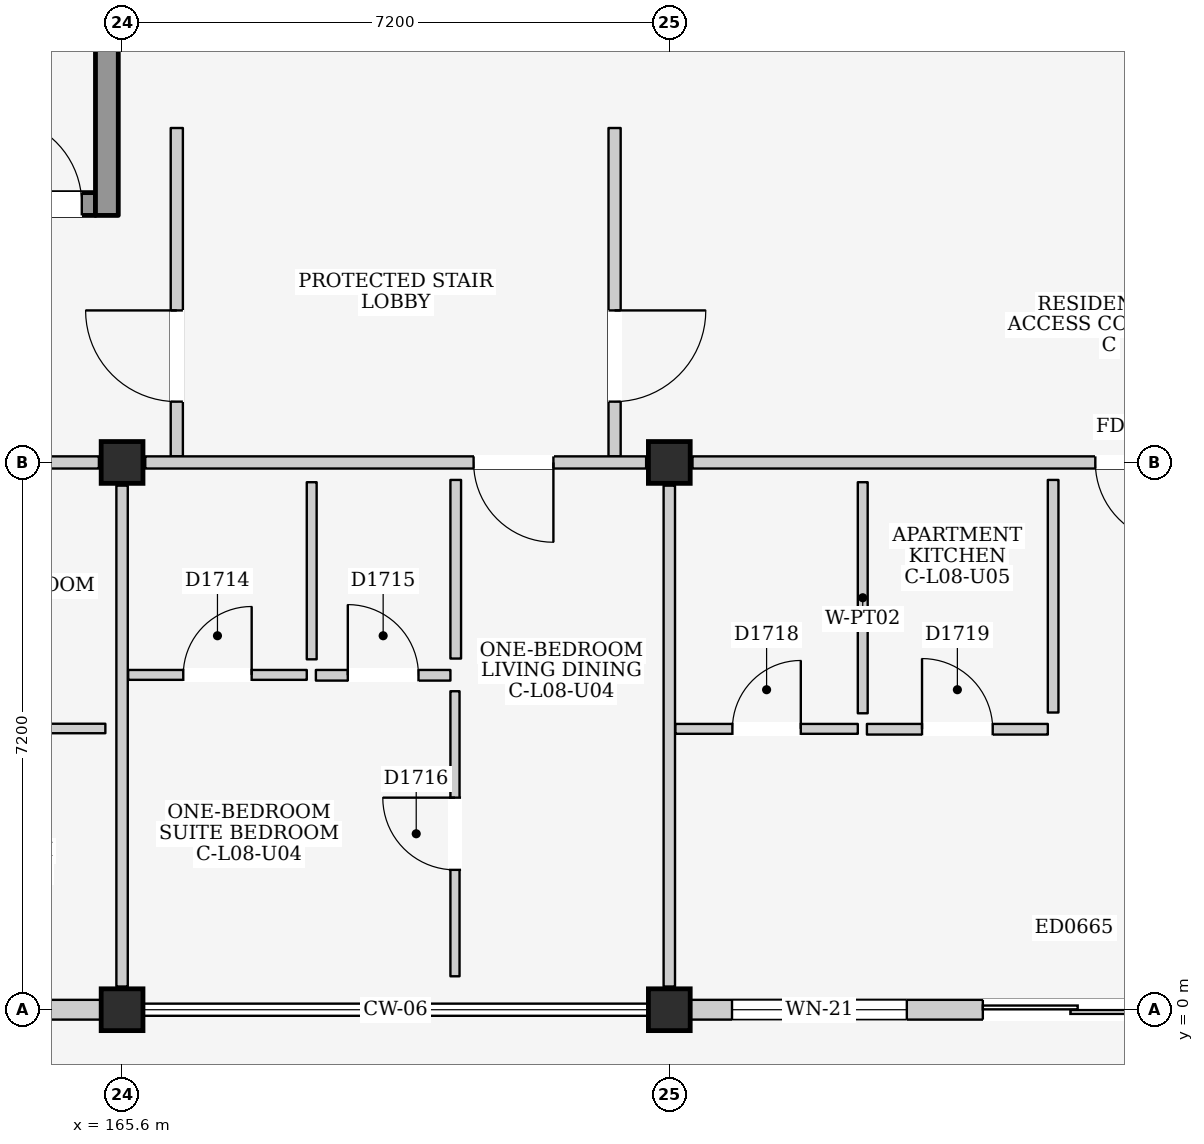
"""IFC4 building model, lengths in metres.
Left out: names, types, materials, properties, quantities, classifications, styles, units other than length and angle.
Written with IfcOpenShell. Run it as: python <this file> out.ifc"""

import sys

from ifc_helpers import new_model, si_unit, direction, frame, frame_2d, origin, origin_2d, place, context, subcontext, project, spatial, rectangle, extrude, element, fill, save


model = new_model("IFC4")
c1 = context("Model", 3, precision=1e-05, world=origin(), true_north=direction((0.0, 1.0)))
c2 = subcontext(c1, "Body", "Model", "MODEL_VIEW")
j1 = project(units=[si_unit("LENGTHUNIT", "METRE"), si_unit("PLANEANGLEUNIT", "RADIAN")], contexts=[c1])
p1 = place(None, origin())
s1 = spatial("IfcSite", under=j1, at=p1, CompositionType="ELEMENT")
p2 = place(p1, origin())
s2 = spatial("IfcBuilding", under=s1, at=p2, CompositionType="ELEMENT")
p3 = place(p2, frame((0.0, 0.0, 28.3)))
s3 = spatial("IfcBuildingStorey", under=s2, at=p3, CompositionType="ELEMENT", Elevation=28.3)
for number, where, z_axis, x_axis in (
    (1, (165.6, 0.0, 0.0), (0.0, 0.0, 1.0), (1.0, 0.0, 0.0)),
    (2, (165.6, 7.2, 0.0), (0.0, 0.0, 1.0), (1.0, 0.0, 0.0)),
    (3, (172.8, 0.0, 0.0), (0.0, 0.0, 1.0), (1.0, 0.0, 0.0)),
    (4, (172.8, 7.2, 0.0), (0.0, 0.0, 1.0), (1.0, 0.0, 0.0)),
):
    element("IfcColumn", number, at=place(p3, frame(where, z_axis=z_axis, x_axis=x_axis)), inside=s3, PredefinedType="COLUMN", context=c2, shape_type="SweptSolid", body=[
        extrude(rectangle(XDim=0.55, YDim=0.55, at=origin_2d()), origin(), (0.0, 0.0, 1.0), 3.2),
    ])
p4 = place(p3, frame((158.675, 0.0, 0.0), z_axis=(0.0, 0.0, 1.0), x_axis=(1.0, 0.0, 0.0)))
e5 = element("IfcWall", 5, at=p4, inside=s3, PredefinedType="ELEMENTEDWALL", context=c2, shape_type="SweptSolid", body=[
    extrude(rectangle(XDim=6.65, YDim=0.26, at=frame_2d((3.325, 0.0))), origin(), (0.0, 0.0, 1.0), 2.485),
])
p5 = place(p4, frame((3.85, 0.0, 0.0)))
e6 = element("IfcOpeningElement", 6, at=p5, cuts=e5, PredefinedType="OPENING", context=c2, shape_type="SweptSolid", body=[
    extrude(rectangle(XDim=1.6, YDim=2.12, at=frame_2d((0.8, 1.06))), frame((0.0, 0.145, 0.0), z_axis=(0.0, -1.0, 0.0), x_axis=(1.0, 0.0, 0.0)), (0.0, 0.0, 1.0), 0.29),
])
p6 = place(p4, frame((0.55, 0.0, 0.9)))
e7 = element("IfcOpeningElement", 7, at=p6, cuts=e5, PredefinedType="OPENING", context=c2, shape_type="SweptSolid", body=[
    extrude(rectangle(XDim=1.65, YDim=1.35, at=frame_2d((0.825, 0.675))), frame((0.0, 0.145, 0.0), z_axis=(0.0, -1.0, 0.0), x_axis=(1.0, 0.0, 0.0)), (0.0, 0.0, 1.0), 0.29),
])
p7 = place(p3, frame((173.075, 0.0, 0.0), z_axis=(0.0, 0.0, 1.0), x_axis=(1.0, 0.0, 0.0)))
e8 = element("IfcWall", 8, at=p7, inside=s3, PredefinedType="ELEMENTEDWALL", context=c2, shape_type="SweptSolid", body=[
    extrude(rectangle(XDim=6.65, YDim=0.26, at=frame_2d((3.325, 0.0))), origin(), (0.0, 0.0, 1.0), 2.485),
])
p8 = place(p7, frame((3.85, 0.0, 0.0)))
e9 = element("IfcOpeningElement", 9, at=p8, cuts=e8, PredefinedType="OPENING", context=c2, shape_type="SweptSolid", body=[
    extrude(rectangle(XDim=2.4, YDim=2.12, at=frame_2d((1.2, 1.06))), frame((0.0, 0.145, 0.0), z_axis=(0.0, -1.0, 0.0), x_axis=(1.0, 0.0, 0.0)), (0.0, 0.0, 1.0), 0.29),
])
p9 = place(p7, frame((0.55, 0.0, 0.775)))
e10 = element("IfcOpeningElement", 10, at=p9, cuts=e8, PredefinedType="OPENING", context=c2, shape_type="SweptSolid", body=[
    extrude(rectangle(XDim=2.3, YDim=1.6, at=frame_2d((1.15, 0.8))), frame((0.0, 0.145, 0.0), z_axis=(0.0, -1.0, 0.0), x_axis=(1.0, 0.0, 0.0)), (0.0, 0.0, 1.0), 0.29),
])
p10 = place(p3, frame((158.75, 10.6, 0.0), z_axis=(0.0, 0.0, 1.0), x_axis=(1.0, 0.0, 0.0)))
e11 = element("IfcWall", 11, at=p10, inside=s3, PredefinedType="SHEAR", context=c2, shape_type="SweptSolid", body=[
    extrude(rectangle(XDim=6.5, YDim=0.3, at=frame_2d((3.25, 0.0))), origin(), (0.0, 0.0, 1.0), 2.95),
])
p11 = place(p10, frame((5.17, 0.0, 0.0)))
e12 = element("IfcOpeningElement", 12, at=p11, cuts=e11, PredefinedType="OPENING", context=c2, shape_type="SweptSolid", body=[
    extrude(rectangle(XDim=1.15, YDim=2.2, at=frame_2d((0.575, 1.1))), frame((0.0, 0.165, 0.0), z_axis=(0.0, -1.0, 0.0), x_axis=(1.0, 0.0, 0.0)), (0.0, 0.0, 1.0), 0.33),
])
p12 = place(p3, frame((165.4, 10.45, 0.0), z_axis=(0.0, 0.0, 1.0), x_axis=(0.0, 1.0, 0.0)))
e13 = element("IfcWall", 13, at=p12, inside=s3, PredefinedType="SHEAR", context=c2, shape_type="SweptSolid", body=[
    extrude(rectangle(XDim=3.6, YDim=0.3, at=frame_2d((1.8, 0.0))), origin(), (0.0, 0.0, 1.0), 2.95),
])
p13 = place(p3, frame((166.32, 7.28, 0.0), z_axis=(0.0, 0.0, 1.0), x_axis=(0.0, 1.0, 0.0)))
e14 = element("IfcWall", 14, at=p13, inside=s3, PredefinedType="PARTITIONING", context=c2, shape_type="SweptSolid", body=[
    extrude(rectangle(XDim=4.32, YDim=0.16, at=frame_2d((2.16, 0.0))), origin(), (0.0, 0.0, 1.0), 2.95),
])
p14 = place(p13, frame((0.72, 0.0, 0.0)))
e15 = element("IfcOpeningElement", 15, at=p14, cuts=e14, PredefinedType="OPENING", context=c2, shape_type="SweptSolid", body=[
    extrude(rectangle(XDim=1.2, YDim=2.2, at=frame_2d((0.6, 1.1))), frame((0.0, 0.095, 0.0), z_axis=(0.0, -1.0, 0.0), x_axis=(1.0, 0.0, 0.0)), (0.0, 0.0, 1.0), 0.19),
])
p15 = place(p3, frame((172.08, 7.28, 0.0), z_axis=(0.0, 0.0, 1.0), x_axis=(0.0, 1.0, 0.0)))
e16 = element("IfcWall", 16, at=p15, inside=s3, PredefinedType="PARTITIONING", context=c2, shape_type="SweptSolid", body=[
    extrude(rectangle(XDim=4.32, YDim=0.16, at=frame_2d((2.16, 0.0))), origin(), (0.0, 0.0, 1.0), 2.95),
])
p16 = place(p15, frame((0.72, 0.0, 0.0)))
e17 = element("IfcOpeningElement", 17, at=p16, cuts=e16, PredefinedType="OPENING", context=c2, shape_type="SweptSolid", body=[
    extrude(rectangle(XDim=1.2, YDim=2.2, at=frame_2d((0.6, 1.1))), frame((0.0, 0.095, 0.0), z_axis=(0.0, -1.0, 0.0), x_axis=(1.0, 0.0, 0.0)), (0.0, 0.0, 1.0), 0.19),
])
p17 = place(p3, frame((158.705, 7.2, 0.0), z_axis=(0.0, 0.0, 1.0), x_axis=(1.0, 0.0, 0.0)))
e18 = element("IfcWall", 18, at=p17, inside=s3, PredefinedType="PARTITIONING", context=c2, shape_type="SweptSolid", body=[
    extrude(rectangle(XDim=6.59, YDim=0.16, at=frame_2d((3.295, 0.0))), origin(), (0.0, 0.0, 1.0), 2.335),
])
p18 = place(p3, frame((165.6, 0.305, 0.0), z_axis=(0.0, 0.0, 1.0), x_axis=(0.0, 1.0, 0.0)))
e19 = element("IfcWall", 19, at=p18, inside=s3, PredefinedType="PARTITIONING", context=c2, shape_type="SweptSolid", body=[
    extrude(rectangle(XDim=6.59, YDim=0.15, at=frame_2d((3.295, 0.0))), origin(), (0.0, 0.0, 1.0), 2.435),
])
p19 = place(p3, frame((161.32, 3.7, 0.0), z_axis=(0.0, 0.0, 1.0), x_axis=(1.0, 0.0, 0.0)))
e20 = element("IfcWall", 20, at=p19, inside=s3, PredefinedType="PARTITIONING", context=c2, shape_type="SweptSolid", body=[
    extrude(rectangle(XDim=4.06, YDim=0.125, at=frame_2d((2.03, 0.0))), origin(), (0.0, 0.0, 1.0), 2.95),
])
p20 = place(p3, frame((165.905, 7.2, 0.0), z_axis=(0.0, 0.0, 1.0), x_axis=(1.0, 0.0, 0.0)))
e21 = element("IfcWall", 21, at=p20, inside=s3, PredefinedType="PARTITIONING", context=c2, shape_type="SweptSolid", body=[
    extrude(rectangle(XDim=6.59, YDim=0.16, at=frame_2d((3.295, 0.0))), origin(), (0.0, 0.0, 1.0), 2.335),
])
p21 = place(p20, frame((4.32, 0.0, 0.0)))
e22 = element("IfcOpeningElement", 22, at=p21, cuts=e21, PredefinedType="OPENING", context=c2, shape_type="SweptSolid", body=[
    extrude(rectangle(XDim=1.05, YDim=2.15, at=frame_2d((0.525, 1.075))), frame((0.0, 0.095, 0.0), z_axis=(0.0, -1.0, 0.0), x_axis=(1.0, 0.0, 0.0)), (0.0, 0.0, 1.0), 0.19),
])
p22 = place(p3, frame((172.8, 0.305, 0.0), z_axis=(0.0, 0.0, 1.0), x_axis=(0.0, 1.0, 0.0)))
e23 = element("IfcWall", 23, at=p22, inside=s3, PredefinedType="PARTITIONING", context=c2, shape_type="SweptSolid", body=[
    extrude(rectangle(XDim=6.59, YDim=0.15, at=frame_2d((3.295, 0.0))), origin(), (0.0, 0.0, 1.0), 2.435),
])
p23 = place(p3, frame((165.68, 4.405, 0.0), z_axis=(0.0, 0.0, 1.0), x_axis=(1.0, 0.0, 0.0)))
e24 = element("IfcWall", 24, at=p23, inside=s3, PredefinedType="PARTITIONING", context=c2, shape_type="SweptSolid", body=[
    extrude(rectangle(XDim=2.35, YDim=0.13, at=frame_2d((1.175, 0.0))), origin(), (0.0, 0.0, 1.0), 2.95),
])
p24 = place(p23, frame((0.725, 0.0, 0.0)))
e25 = element("IfcOpeningElement", 25, at=p24, cuts=e24, PredefinedType="OPENING", context=c2, shape_type="SweptSolid", body=[
    extrude(rectangle(XDim=0.9, YDim=2.1, at=frame_2d((0.45, 1.05))), frame((0.0, 0.08, 0.0), z_axis=(0.0, -1.0, 0.0), x_axis=(1.0, 0.0, 0.0)), (0.0, 0.0, 1.0), 0.16),
])
p25 = place(p3, frame((168.095, 4.61, 0.0), z_axis=(0.0, 0.0, 1.0), x_axis=(0.0, 1.0, 0.0)))
e26 = element("IfcWall", 26, at=p25, inside=s3, PredefinedType="PARTITIONING", context=c2, shape_type="SweptSolid", body=[
    extrude(rectangle(XDim=2.33, YDim=0.13, at=frame_2d((1.165, 0.0))), origin(), (0.0, 0.0, 1.0), 2.95),
])
p26 = place(p3, frame((168.15, 4.4, 0.0), z_axis=(0.0, 0.0, 1.0), x_axis=(1.0, 0.0, 0.0)))
e27 = element("IfcWall", 27, at=p26, inside=s3, PredefinedType="PARTITIONING", context=c2, shape_type="SweptSolid", body=[
    extrude(rectangle(XDim=1.77, YDim=0.14, at=frame_2d((0.885, 0.0))), origin(), (0.0, 0.0, 1.0), 2.95),
])
p27 = place(p26, frame((0.42, 0.0, 0.0)))
e28 = element("IfcOpeningElement", 28, at=p27, cuts=e27, PredefinedType="OPENING", context=c2, shape_type="SweptSolid", body=[
    extrude(rectangle(XDim=0.93, YDim=2.14, at=frame_2d((0.465, 1.07))), frame((0.0, 0.085, 0.0), z_axis=(0.0, -1.0, 0.0), x_axis=(1.0, 0.0, 0.0)), (0.0, 0.0, 1.0), 0.17),
])
p28 = place(p3, frame((169.99, 4.62, 0.0), z_axis=(0.0, 0.0, 1.0), x_axis=(0.0, 1.0, 0.0)))
e29 = element("IfcWall", 29, at=p28, inside=s3, PredefinedType="PARTITIONING", context=c2, shape_type="SweptSolid", body=[
    extrude(rectangle(XDim=2.35, YDim=0.14, at=frame_2d((1.175, 0.0))), origin(), (0.0, 0.0, 1.0), 2.95),
])
p29 = place(p3, frame((169.98, 0.44, 0.0), z_axis=(0.0, 0.0, 1.0), x_axis=(0.0, 1.0, 0.0)))
e30 = element("IfcWall", 30, at=p29, inside=s3, PredefinedType="PARTITIONING", context=c2, shape_type="SweptSolid", body=[
    extrude(rectangle(XDim=3.75, YDim=0.12, at=frame_2d((1.875, 0.0))), origin(), (0.0, 0.0, 1.0), 2.95),
])
p30 = place(p29, frame((1.4, 0.0, 0.0)))
e31 = element("IfcOpeningElement", 31, at=p30, cuts=e30, PredefinedType="OPENING", context=c2, shape_type="SweptSolid", body=[
    extrude(rectangle(XDim=0.95, YDim=2.15, at=frame_2d((0.475, 1.075))), frame((0.0, 0.075, 0.0), z_axis=(0.0, -1.0, 0.0), x_axis=(1.0, 0.0, 0.0)), (0.0, 0.0, 1.0), 0.15),
])
p31 = place(p3, frame((173.105, 7.2, 0.0), z_axis=(0.0, 0.0, 1.0), x_axis=(1.0, 0.0, 0.0)))
e32 = element("IfcWall", 32, at=p31, inside=s3, PredefinedType="PARTITIONING", context=c2, shape_type="SweptSolid", body=[
    extrude(rectangle(XDim=6.59, YDim=0.16, at=frame_2d((3.295, 0.0))), origin(), (0.0, 0.0, 1.0), 2.335),
])
p32 = place(p31, frame((5.3, 0.0, 0.0)))
e33 = element("IfcOpeningElement", 33, at=p32, cuts=e32, PredefinedType="OPENING", context=c2, shape_type="SweptSolid", body=[
    extrude(rectangle(XDim=1.05, YDim=2.15, at=frame_2d((0.525, 1.075))), frame((0.0, 0.095, 0.0), z_axis=(0.0, -1.0, 0.0), x_axis=(1.0, 0.0, 0.0)), (0.0, 0.0, 1.0), 0.19),
])
p33 = place(p3, frame((172.88, 3.695, 0.0), z_axis=(0.0, 0.0, 1.0), x_axis=(1.0, 0.0, 0.0)))
e34 = element("IfcWall", 34, at=p33, inside=s3, PredefinedType="PARTITIONING", context=c2, shape_type="SweptSolid", body=[
    extrude(rectangle(XDim=2.4, YDim=0.13, at=frame_2d((1.2, 0.0))), origin(), (0.0, 0.0, 1.0), 2.95),
])
p34 = place(p33, frame((0.75, 0.0, 0.0)))
e35 = element("IfcOpeningElement", 35, at=p34, cuts=e34, PredefinedType="OPENING", context=c2, shape_type="SweptSolid", body=[
    extrude(rectangle(XDim=0.9, YDim=2.1, at=frame_2d((0.45, 1.05))), frame((0.0, 0.08, 0.0), z_axis=(0.0, -1.0, 0.0), x_axis=(1.0, 0.0, 0.0)), (0.0, 0.0, 1.0), 0.16),
])
p35 = place(p3, frame((175.345, 3.9, 0.0), z_axis=(0.0, 0.0, 1.0), x_axis=(0.0, 1.0, 0.0)))
e36 = element("IfcWall", 36, at=p35, inside=s3, PredefinedType="PARTITIONING", context=c2, shape_type="SweptSolid", body=[
    extrude(rectangle(XDim=3.04, YDim=0.13, at=frame_2d((1.52, 0.0))), origin(), (0.0, 0.0, 1.0), 2.95),
])
p36 = place(p3, frame((175.4, 3.69, 0.0), z_axis=(0.0, 0.0, 1.0), x_axis=(1.0, 0.0, 0.0)))
e37 = element("IfcWall", 37, at=p36, inside=s3, PredefinedType="PARTITIONING", context=c2, shape_type="SweptSolid", body=[
    extrude(rectangle(XDim=2.38, YDim=0.14, at=frame_2d((1.19, 0.0))), origin(), (0.0, 0.0, 1.0), 2.95),
])
p37 = place(p36, frame((0.725, 0.0, 0.0)))
e38 = element("IfcOpeningElement", 38, at=p37, cuts=e37, PredefinedType="OPENING", context=c2, shape_type="SweptSolid", body=[
    extrude(rectangle(XDim=0.93, YDim=2.14, at=frame_2d((0.465, 1.07))), frame((0.0, 0.085, 0.0), z_axis=(0.0, -1.0, 0.0), x_axis=(1.0, 0.0, 0.0)), (0.0, 0.0, 1.0), 0.17),
])
p38 = place(p3, frame((177.85, 3.91, 0.0), z_axis=(0.0, 0.0, 1.0), x_axis=(0.0, 1.0, 0.0)))
e39 = element("IfcWall", 39, at=p38, inside=s3, PredefinedType="PARTITIONING", context=c2, shape_type="SweptSolid", body=[
    extrude(rectangle(XDim=3.06, YDim=0.14, at=frame_2d((1.53, 0.0))), origin(), (0.0, 0.0, 1.0), 2.95),
])
p39 = place(p8, frame((2.4, 0.0, 0.0), z_axis=(0.0, 0.0, 1.0), x_axis=(-1.0, 0.0, 0.0)))
e40 = element("IfcDoor", 40, at=p39, inside=s3, OperationType="DOUBLE_DOOR_SLIDING", PredefinedType="DOOR", context=c2, shape_type="SweptSolid", body=[
    extrude(rectangle(XDim=2.4, YDim=2.12, at=frame_2d((1.2, 1.06))), frame((0.0, 0.025, 0.0), z_axis=(0.0, -1.0, 0.0), x_axis=(1.0, 0.0, 0.0)), (0.0, 0.0, 1.0), 0.05),
])
fill(e9, e40)
p40 = place(p9, origin())
e41 = element("IfcWindow", 41, at=p40, inside=s3, PartitioningType="TRIPLE_PANEL_VERTICAL", PredefinedType="WINDOW", context=c2, shape_type="SweptSolid", body=[
    extrude(rectangle(XDim=2.3, YDim=1.6, at=frame_2d((1.15, 0.8))), frame((0.0, 0.03, 0.0), z_axis=(0.0, -1.0, 0.0), x_axis=(1.0, 0.0, 0.0)), (0.0, 0.0, 1.0), 0.06),
])
fill(e10, e41)
p41 = place(p11, origin())
e42 = element("IfcDoor", 42, at=p41, inside=s3, OperationType="SINGLE_SWING_LEFT", PredefinedType="DOOR", context=c2, shape_type="SweptSolid", body=[
    extrude(rectangle(XDim=1.15, YDim=2.2, at=frame_2d((0.575, 1.1))), frame((0.0, 0.025, 0.0), z_axis=(0.0, -1.0, 0.0), x_axis=(1.0, 0.0, 0.0)), (0.0, 0.0, 1.0), 0.05),
])
fill(e12, e42)
p42 = place(p14, origin())
e43 = element("IfcDoor", 43, at=p42, inside=s3, OperationType="SINGLE_SWING_RIGHT", PredefinedType="DOOR", context=c2, shape_type="SweptSolid", body=[
    extrude(rectangle(XDim=1.2, YDim=2.2, at=frame_2d((0.6, 1.1))), frame((0.0, 0.025, 0.0), z_axis=(0.0, -1.0, 0.0), x_axis=(1.0, 0.0, 0.0)), (0.0, 0.0, 1.0), 0.05),
])
fill(e15, e43)
p43 = place(p16, frame((1.2, 0.0, 0.0), z_axis=(0.0, 0.0, 1.0), x_axis=(-1.0, 0.0, 0.0)))
e44 = element("IfcDoor", 44, at=p43, inside=s3, OperationType="SINGLE_SWING_LEFT", PredefinedType="DOOR", context=c2, shape_type="SweptSolid", body=[
    extrude(rectangle(XDim=1.2, YDim=2.2, at=frame_2d((0.6, 1.1))), frame((0.0, 0.025, 0.0), z_axis=(0.0, -1.0, 0.0), x_axis=(1.0, 0.0, 0.0)), (0.0, 0.0, 1.0), 0.05),
])
fill(e17, e44)
p44 = place(p21, frame((1.05, 0.0, 0.0), z_axis=(0.0, 0.0, 1.0), x_axis=(-1.0, 0.0, 0.0)))
e45 = element("IfcDoor", 45, at=p44, inside=s3, OperationType="SINGLE_SWING_LEFT", PredefinedType="DOOR", context=c2, shape_type="SweptSolid", body=[
    extrude(rectangle(XDim=1.05, YDim=2.15, at=frame_2d((0.525, 1.075))), frame((0.0, 0.025, 0.0), z_axis=(0.0, -1.0, 0.0), x_axis=(1.0, 0.0, 0.0)), (0.0, 0.0, 1.0), 0.05),
])
fill(e22, e45)
p45 = place(p24, origin())
e46 = element("IfcDoor", 46, at=p45, inside=s3, OperationType="SINGLE_SWING_RIGHT", PredefinedType="DOOR", context=c2, shape_type="SweptSolid", body=[
    extrude(rectangle(XDim=0.9, YDim=2.1, at=frame_2d((0.45, 1.05))), frame((0.0, 0.025, 0.0), z_axis=(0.0, -1.0, 0.0), x_axis=(1.0, 0.0, 0.0)), (0.0, 0.0, 1.0), 0.05),
])
fill(e25, e46)
p46 = place(p27, origin())
e47 = element("IfcDoor", 47, at=p46, inside=s3, OperationType="SINGLE_SWING_LEFT", PredefinedType="DOOR", context=c2, shape_type="SweptSolid", body=[
    extrude(rectangle(XDim=0.93, YDim=2.14, at=frame_2d((0.465, 1.07))), frame((0.0, 0.025, 0.0), z_axis=(0.0, -1.0, 0.0), x_axis=(1.0, 0.0, 0.0)), (0.0, 0.0, 1.0), 0.05),
])
fill(e28, e47)
p47 = place(p30, origin())
e48 = element("IfcDoor", 48, at=p47, inside=s3, OperationType="SINGLE_SWING_RIGHT", PredefinedType="DOOR", context=c2, shape_type="SweptSolid", body=[
    extrude(rectangle(XDim=0.95, YDim=2.15, at=frame_2d((0.475, 1.075))), frame((0.0, 0.025, 0.0), z_axis=(0.0, -1.0, 0.0), x_axis=(1.0, 0.0, 0.0)), (0.0, 0.0, 1.0), 0.05),
])
fill(e31, e48)
p48 = place(p32, frame((1.05, 0.0, 0.0), z_axis=(0.0, 0.0, 1.0), x_axis=(-1.0, 0.0, 0.0)))
e49 = element("IfcDoor", 49, at=p48, inside=s3, OperationType="SINGLE_SWING_LEFT", PredefinedType="DOOR", context=c2, shape_type="SweptSolid", body=[
    extrude(rectangle(XDim=1.05, YDim=2.15, at=frame_2d((0.525, 1.075))), frame((0.0, 0.025, 0.0), z_axis=(0.0, -1.0, 0.0), x_axis=(1.0, 0.0, 0.0)), (0.0, 0.0, 1.0), 0.05),
])
fill(e33, e49)
p49 = place(p34, origin())
e50 = element("IfcDoor", 50, at=p49, inside=s3, OperationType="SINGLE_SWING_RIGHT", PredefinedType="DOOR", context=c2, shape_type="SweptSolid", body=[
    extrude(rectangle(XDim=0.9, YDim=2.1, at=frame_2d((0.45, 1.05))), frame((0.0, 0.025, 0.0), z_axis=(0.0, -1.0, 0.0), x_axis=(1.0, 0.0, 0.0)), (0.0, 0.0, 1.0), 0.05),
])
fill(e35, e50)
p50 = place(p37, origin())
e51 = element("IfcDoor", 51, at=p50, inside=s3, OperationType="SINGLE_SWING_LEFT", PredefinedType="DOOR", context=c2, shape_type="SweptSolid", body=[
    extrude(rectangle(XDim=0.93, YDim=2.14, at=frame_2d((0.465, 1.07))), frame((0.0, 0.025, 0.0), z_axis=(0.0, -1.0, 0.0), x_axis=(1.0, 0.0, 0.0)), (0.0, 0.0, 1.0), 0.05),
])
fill(e38, e51)
save(model, sys.argv[1])
